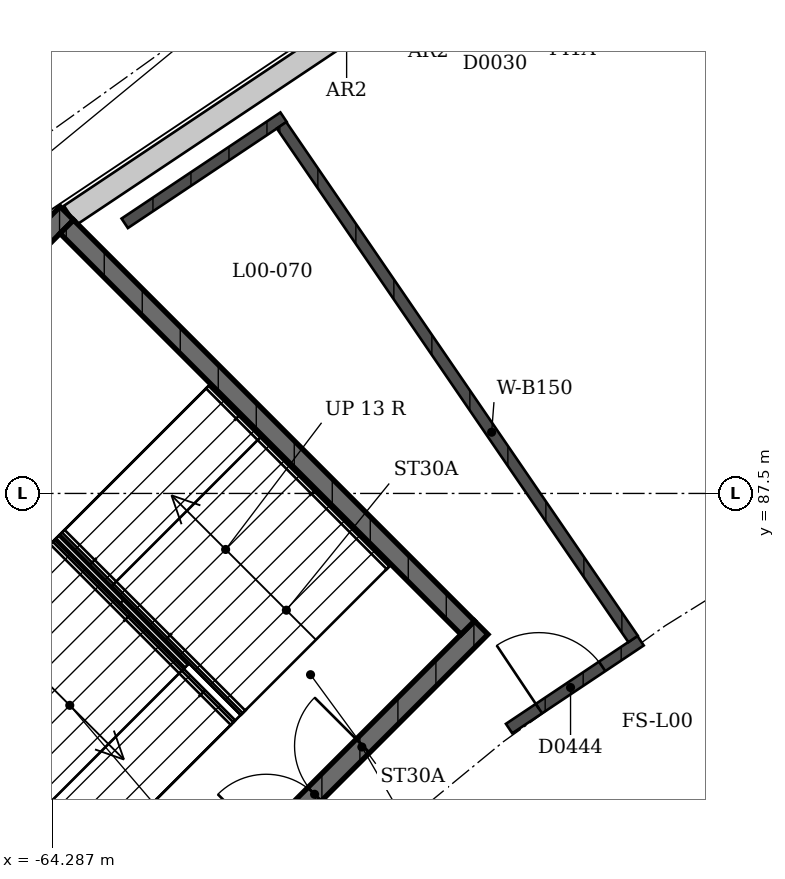
"""IFC4 building model, lengths in metres.
Left out: names, types, materials, properties, quantities, classifications, styles, units other than length and angle.
Written with IfcOpenShell. Run it as: python <this file> out.ifc"""

import sys

from ifc_helpers import new_model, si_unit, direction, frame, frame_2d, origin, place, context, subcontext, project, spatial, rectangle, extrude, element, fill, save


model = new_model("IFC4")
c1 = context("Model", 3, precision=1e-05, world=origin(), true_north=direction((0.0, 1.0)))
c2 = subcontext(c1, "Body", "Model", "MODEL_VIEW")
j1 = project(units=[si_unit("LENGTHUNIT", "METRE"), si_unit("PLANEANGLEUNIT", "RADIAN")], contexts=[c1])
p1 = place(None, origin())
s1 = spatial("IfcSite", under=j1, at=p1, CompositionType="ELEMENT")
p2 = place(p1, origin())
s2 = spatial("IfcBuilding", under=s1, at=p2, CompositionType="ELEMENT")
p3 = place(p2, origin())
s3 = spatial("IfcBuildingStorey", under=s2, at=p3, CompositionType="ELEMENT", Elevation=0.0)
p4 = place(p3, frame((-64.049, 91.16, 0.0), z_axis=(0.0, 0.0, 1.0), x_axis=(0.831462397957, 0.555581029899, 0.0)))
e1 = element("IfcWall", 1, at=p4, inside=s3, PredefinedType="SOLIDWALL", context=c2, shape_type="SweptSolid", body=[
    extrude(rectangle(XDim=12.66, YDim=0.3, at=frame_2d((6.33, 0.0))), origin(), (0.0, 0.0, 1.0), 2.79),
])
p5 = place(p4, frame((4.349, 0.0, 0.0)))
e2 = element("IfcOpeningElement", 2, at=p5, cuts=e1, PredefinedType="OPENING", context=c2, shape_type="SweptSolid", body=[
    extrude(rectangle(XDim=3.0, YDim=2.4, at=frame_2d((1.5, 1.2))), frame((0.0, 0.16, 0.0), z_axis=(0.0, -1.0, 0.0), x_axis=(1.0, 0.0, 0.0)), (0.0, 0.0, 1.0), 0.32),
])
p6 = place(p3, frame((-58.643, 85.734, 0.0), z_axis=(0.0, 0.0, 1.0), x_axis=(-0.707106781187, -0.707106781187, 0.0)))
e3 = element("IfcWall", 3, at=p6, inside=s3, PredefinedType="SHEAR", context=c2, shape_type="SweptSolid", body=[
    extrude(rectangle(XDim=12.15, YDim=0.25, at=frame_2d((6.075, 0.0))), origin(), (0.0, 0.0, 1.0), 4.09),
])
p7 = place(p6, frame((2.2, 0.0, 0.0)))
e4 = element("IfcOpeningElement", 4, at=p7, cuts=e3, PredefinedType="OPENING", context=c2, shape_type="SweptSolid", body=[
    extrude(rectangle(XDim=1.8, YDim=2.1, at=frame_2d((0.9, 1.05))), frame((0.0, 0.125, 0.0), z_axis=(0.0, -1.0, 0.0), x_axis=(1.0, 0.0, 0.0)), (0.0, 0.0, 1.0), 0.25),
])
p8 = place(p6, frame((8.15, 0.0, 0.0)))
e5 = element("IfcOpeningElement", 5, at=p8, cuts=e3, PredefinedType="OPENING", context=c2, shape_type="SweptSolid", body=[
    extrude(rectangle(XDim=1.8, YDim=2.1, at=frame_2d((0.9, 1.05))), frame((0.0, 0.125, 0.0), z_axis=(0.0, -1.0, 0.0), x_axis=(1.0, 0.0, 0.0)), (0.0, 0.0, 1.0), 0.25),
])
p9 = place(p3, frame((-64.094, 91.186, 0.0), z_axis=(0.0, 0.0, 1.0), x_axis=(-0.707106781187, -0.707106781187, 0.0)))
e6 = element("IfcWall", 6, at=p9, inside=s3, PredefinedType="SHEAR", context=c2, shape_type="SweptSolid", body=[
    extrude(rectangle(XDim=12.15, YDim=0.25, at=frame_2d((6.075, 0.0))), origin(), (0.0, 0.0, 1.0), 4.09),
])
p10 = place(p3, frame((-58.819, 85.734, 0.0), z_axis=(0.0, 0.0, 1.0), x_axis=(-0.707123144286, 0.707090417709, 0.0)))
e7 = element("IfcWall", 7, at=p10, inside=s3, PredefinedType="SHEAR", context=c2, shape_type="SweptSolid", body=[
    extrude(rectangle(XDim=7.46, YDim=0.25, at=frame_2d((3.73, 0.0))), origin(), (0.0, 0.0, 1.0), 4.09),
])
p11 = place(p3, frame((-63.027, 81.527, 0.0), z_axis=(0.0, 0.0, 1.0), x_axis=(-0.707106781187, 0.707106781187, 0.0)))
e8 = element("IfcWall", 8, at=p11, inside=s3, PredefinedType="SHEAR", context=c2, shape_type="SweptSolid", body=[
    extrude(rectangle(XDim=7.46, YDim=0.25, at=frame_2d((3.73, 0.0))), origin(), (0.0, 0.0, 1.0), 4.09),
])
p12 = place(p3, frame((-58.275, 84.407, 0.0), z_axis=(0.0, 0.0, 1.0), x_axis=(0.831526298134, 0.555485387307, 0.0)))
e9 = element("IfcWall", 9, at=p12, inside=s3, PredefinedType="SOLIDWALL", context=c2, shape_type="SweptSolid", body=[
    extrude(rectangle(XDim=2.08, YDim=0.15, at=frame_2d((1.04, 0.0))), origin(), (0.0, 0.0, 1.0), 3.0),
])
p13 = place(p12, frame((0.472, 0.0, 0.0)))
e10 = element("IfcOpeningElement", 10, at=p13, cuts=e9, PredefinedType="OPENING", context=c2, shape_type="SweptSolid", body=[
    extrude(rectangle(XDim=1.0, YDim=2.1, at=frame_2d((0.5, 1.05))), frame((0.0, 0.075, 0.0), z_axis=(0.0, -1.0, 0.0), x_axis=(1.0, 0.0, 0.0)), (0.0, 0.0, 1.0), 0.15),
])
p14 = place(p3, frame((-63.333, 91.054, 0.0), z_axis=(0.0, 0.0, 1.0), x_axis=(0.831482054195, 0.555551611961, 0.0)))
e11 = element("IfcWall", 11, at=p14, inside=s3, PredefinedType="SOLIDWALL", context=c2, shape_type="SweptSolid", body=[
    extrude(rectangle(XDim=2.514, YDim=0.15, at=frame_2d((1.257, 0.0))), origin(), (0.0, 0.0, 1.0), 3.0),
])
p15 = place(p3, frame((-56.644, 85.585, 0.0), z_axis=(0.0, 0.0, 1.0), x_axis=(-0.564785434986, 0.825237791444, 0.0)))
e12 = element("IfcWall", 12, at=p15, inside=s3, PredefinedType="SOLIDWALL", context=c2, shape_type="SweptSolid", body=[
    extrude(rectangle(XDim=8.19, YDim=0.15, at=frame_2d((4.095, 0.0))), origin(), (0.0, 0.0, 1.0), 3.0),
])
p16 = place(p7, origin())
e13 = element("IfcDoor", 13, at=p16, inside=s3, OperationType="DOUBLE_DOOR_SINGLE_SWING", PredefinedType="DOOR", context=c2, shape_type="SweptSolid", body=[
    extrude(rectangle(XDim=1.8, YDim=2.1, at=frame_2d((0.9, 1.05))), frame((0.0, 0.025, 0.0), z_axis=(0.0, -1.0, 0.0), x_axis=(1.0, 0.0, 0.0)), (0.0, 0.0, 1.0), 0.05),
])
fill(e4, e13)
p17 = place(p13, origin())
e14 = element("IfcDoor", 14, at=p17, inside=s3, OperationType="SINGLE_SWING_RIGHT", PredefinedType="DOOR", context=c2, shape_type="SweptSolid", body=[
    extrude(rectangle(XDim=1.0, YDim=2.1, at=frame_2d((0.5, 1.05))), frame((0.0, 0.025, 0.0), z_axis=(0.0, -1.0, 0.0), x_axis=(1.0, 0.0, 0.0)), (0.0, 0.0, 1.0), 0.05),
])
fill(e10, e14)
save(model, sys.argv[1])
